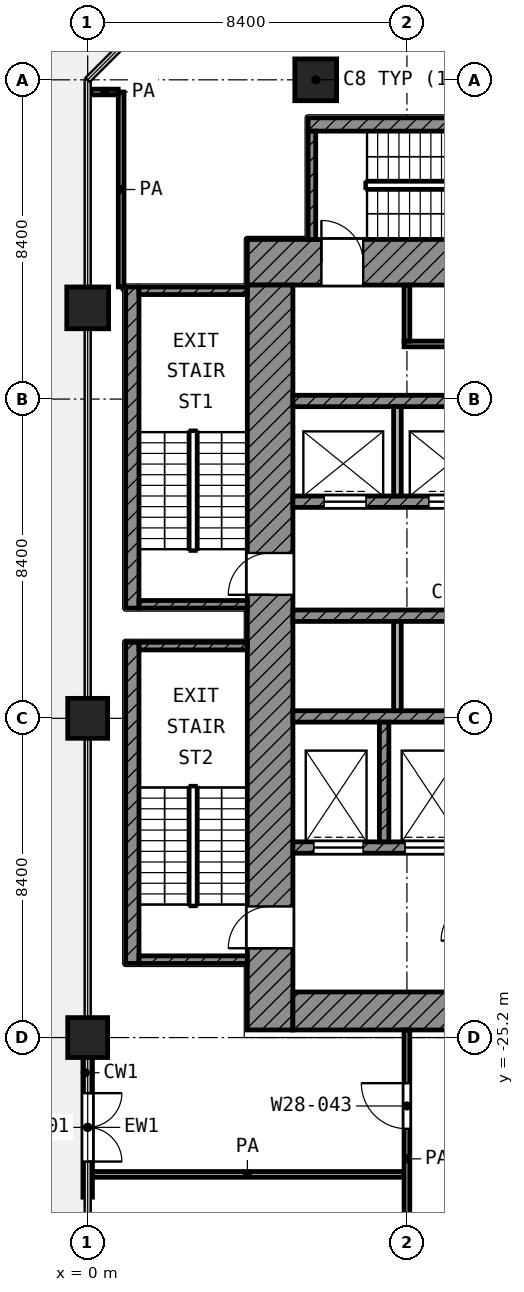
"""IFC4 building model, lengths in metres.
Left out: names, types, materials, properties, quantities, classifications, styles, units other than length and angle.
Written with IfcOpenShell. Run it as: python <this file> out.ifc"""

import sys

from ifc_helpers import new_model, si_unit, direction, frame, frame_2d, origin, origin_2d, place, context, subcontext, project, spatial, rectangle, extrude, element, fill, save


model = new_model("IFC4")
c1 = context("Model", 3, precision=1e-05, world=origin(), true_north=direction((0.0, 1.0)))
c2 = subcontext(c1, "Body", "Model", "MODEL_VIEW")
j1 = project(units=[si_unit("LENGTHUNIT", "METRE"), si_unit("PLANEANGLEUNIT", "RADIAN")], contexts=[c1])
p1 = place(None, origin())
s1 = spatial("IfcSite", under=j1, at=p1, CompositionType="ELEMENT")
p2 = place(p1, origin())
s2 = spatial("IfcBuilding", under=s1, at=p2, CompositionType="ELEMENT")
p3 = place(p2, frame((0.0, 0.0, 145.0)))
s3 = spatial("IfcBuildingStorey", under=s2, at=p3, CompositionType="ELEMENT", Elevation=145.0)
for number, where, z_axis, x_axis in (
    (1, (6.0, 0.0, 0.0), (0.0, 0.0, 1.0), (1.0, 0.0, 0.0)),
    (2, (0.0, -6.0, 0.0), (0.0, 0.0, 1.0), (1.0, 0.0, 0.0)),
):
    element("IfcColumn", number, at=place(p3, frame(where, z_axis=z_axis, x_axis=x_axis)), inside=s3, PredefinedType="COLUMN", context=c2, shape_type="SweptSolid", body=[
        extrude(rectangle(XDim=1.1, YDim=1.1, at=origin_2d()), origin(), (0.0, 0.0, 1.0), 4.2),
    ])
for number, where, z_axis, x_axis in (
    (3, (0.0, -16.8, 0.0), (0.0, 0.0, 1.0), (1.0, 0.0, 0.0)),
    (4, (0.0, -25.2, 0.0), (0.0, 0.0, 1.0), (1.0, 0.0, 0.0)),
):
    element("IfcColumn", number, at=place(p3, frame(where, z_axis=z_axis, x_axis=x_axis)), inside=s3, PredefinedType="COLUMN", context=c2, shape_type="SweptSolid", body=[
        extrude(rectangle(XDim=1.05, YDim=1.05, at=origin_2d()), origin(), (0.0, 0.0, 1.0), 4.2),
    ])
p4 = place(p3, frame((0.0, -25.725, 0.0), z_axis=(0.0, 0.0, 1.0), x_axis=(0.0, -1.0, 0.0)))
e5 = element("IfcWall", 5, at=p4, inside=s3, PredefinedType="SOLIDWALL", context=c2, shape_type="SweptSolid", body=[
    extrude(rectangle(XDim=3.675, YDim=0.25, at=frame_2d((1.837, 0.0))), origin(), (0.0, 0.0, 1.0), 3.48),
])
p5 = place(p4, frame((0.938, 0.0, 0.0)))
e6 = element("IfcOpeningElement", 6, at=p5, cuts=e5, PredefinedType="OPENING", context=c2, shape_type="SweptSolid", body=[
    extrude(rectangle(XDim=1.8, YDim=2.1, at=frame_2d((0.9, 1.05))), frame((0.0, 0.135, 0.0), z_axis=(0.0, -1.0, 0.0), x_axis=(1.0, 0.0, 0.0)), (0.0, 0.0, 1.0), 0.27),
])
p6 = place(p3, frame((4.2, -4.8, 0.0), z_axis=(0.0, 0.0, 1.0), x_axis=(1.0, 0.0, 0.0)))
e7 = element("IfcWall", 7, at=p6, inside=s3, PredefinedType="SHEAR", context=c2, shape_type="SweptSolid", body=[
    extrude(rectangle(XDim=20.8, YDim=1.2, at=frame_2d((10.4, 0.0))), origin(), (0.0, 0.0, 1.0), 3.6),
])
p7 = place(p6, frame((1.95, 0.0, 0.0)))
e8 = element("IfcOpeningElement", 8, at=p7, cuts=e7, PredefinedType="OPENING", context=c2, shape_type="SweptSolid", body=[
    extrude(rectangle(XDim=1.1, YDim=2.1, at=frame_2d((0.55, 1.05))), frame((0.0, 0.61, 0.0), z_axis=(0.0, -1.0, 0.0), x_axis=(1.0, 0.0, 0.0)), (0.0, 0.0, 1.0), 1.22),
])
p8 = place(p6, frame((17.95, 0.0, 0.0)))
e9 = element("IfcOpeningElement", 9, at=p8, cuts=e7, PredefinedType="OPENING", context=c2, shape_type="SweptSolid", body=[
    extrude(rectangle(XDim=1.1, YDim=2.1, at=frame_2d((0.55, 1.05))), frame((0.0, 0.61, 0.0), z_axis=(0.0, -1.0, 0.0), x_axis=(1.0, 0.0, 0.0)), (0.0, 0.0, 1.0), 1.22),
])
p9 = place(p3, frame((4.8, -25.0, 0.0), z_axis=(0.0, 0.0, 1.0), x_axis=(0.0, 1.0, 0.0)))
e10 = element("IfcWall", 10, at=p9, inside=s3, PredefinedType="SHEAR", context=c2, shape_type="SweptSolid", body=[
    extrude(rectangle(XDim=19.6, YDim=1.2, at=frame_2d((9.8, 0.0))), origin(), (0.0, 0.0, 1.0), 3.6),
])
p10 = place(p9, frame((11.45, 0.0, 0.0)))
e11 = element("IfcOpeningElement", 11, at=p10, cuts=e10, PredefinedType="OPENING", context=c2, shape_type="SweptSolid", body=[
    extrude(rectangle(XDim=1.1, YDim=2.1, at=frame_2d((0.55, 1.05))), frame((0.0, 0.61, 0.0), z_axis=(0.0, -1.0, 0.0), x_axis=(1.0, 0.0, 0.0)), (0.0, 0.0, 1.0), 1.22),
])
p11 = place(p9, frame((2.15, 0.0, 0.0)))
e12 = element("IfcOpeningElement", 12, at=p11, cuts=e10, PredefinedType="OPENING", context=c2, shape_type="SweptSolid", body=[
    extrude(rectangle(XDim=1.1, YDim=2.1, at=frame_2d((0.55, 1.05))), frame((0.0, 0.61, 0.0), z_axis=(0.0, -1.0, 0.0), x_axis=(1.0, 0.0, 0.0)), (0.0, 0.0, 1.0), 1.22),
])
p12 = place(p3, frame((5.4, -24.5, 0.0), z_axis=(0.0, 0.0, 1.0), x_axis=(1.0, 0.0, 0.0)))
e13 = element("IfcWall", 13, at=p12, inside=s3, PredefinedType="SHEAR", context=c2, shape_type="SweptSolid", body=[
    extrude(rectangle(XDim=18.6, YDim=1.0, at=frame_2d((9.3, 0.0))), origin(), (0.0, 0.0, 1.0), 3.6),
])
p13 = place(p12, frame((6.3, 0.0, 0.0)))
e14 = element("IfcOpeningElement", 14, at=p13, cuts=e13, PredefinedType="OPENING", context=c2, shape_type="SweptSolid", body=[
    extrude(rectangle(XDim=1.8, YDim=2.1, at=frame_2d((0.9, 1.05))), frame((0.0, 0.51, 0.0), z_axis=(0.0, -1.0, 0.0), x_axis=(1.0, 0.0, 0.0)), (0.0, 0.0, 1.0), 1.02),
])
p14 = place(p3, frame((5.4, -8.45, 0.0), z_axis=(0.0, 0.0, 1.0), x_axis=(1.0, 0.0, 0.0)))
e15 = element("IfcWall", 15, at=p14, inside=s3, PredefinedType="SHEAR", context=c2, shape_type="SweptSolid", body=[
    extrude(rectangle(XDim=16.65, YDim=0.3, at=frame_2d((8.325, 0.0))), origin(), (0.0, 0.0, 1.0), 3.6),
])
p15 = place(p3, frame((5.4, -11.1, 0.0), z_axis=(0.0, 0.0, 1.0), x_axis=(1.0, 0.0, 0.0)))
e16 = element("IfcWall", 16, at=p15, inside=s3, PredefinedType="SHEAR", context=c2, shape_type="SweptSolid", body=[
    extrude(rectangle(XDim=16.65, YDim=0.3, at=frame_2d((8.325, 0.0))), origin(), (0.0, 0.0, 1.0), 3.6),
])
p16 = place(p15, frame((0.825, 0.0, 0.0)))
e17 = element("IfcOpeningElement", 17, at=p16, cuts=e16, PredefinedType="OPENING", context=c2, shape_type="SweptSolid", body=[
    extrude(rectangle(XDim=1.1, YDim=2.1, at=frame_2d((0.55, 1.05))), frame((0.0, 0.16, 0.0), z_axis=(0.0, -1.0, 0.0), x_axis=(1.0, 0.0, 0.0)), (0.0, 0.0, 1.0), 0.32),
])
p17 = place(p15, frame((3.575, 0.0, 0.0)))
e18 = element("IfcOpeningElement", 18, at=p17, cuts=e16, PredefinedType="OPENING", context=c2, shape_type="SweptSolid", body=[
    extrude(rectangle(XDim=1.1, YDim=2.1, at=frame_2d((0.55, 1.05))), frame((0.0, 0.16, 0.0), z_axis=(0.0, -1.0, 0.0), x_axis=(1.0, 0.0, 0.0)), (0.0, 0.0, 1.0), 0.32),
])
p18 = place(p15, frame((6.325, 0.0, 0.0)))
e19 = element("IfcOpeningElement", 19, at=p18, cuts=e16, PredefinedType="OPENING", context=c2, shape_type="SweptSolid", body=[
    extrude(rectangle(XDim=1.1, YDim=2.1, at=frame_2d((0.55, 1.05))), frame((0.0, 0.16, 0.0), z_axis=(0.0, -1.0, 0.0), x_axis=(1.0, 0.0, 0.0)), (0.0, 0.0, 1.0), 0.32),
])
p19 = place(p15, frame((9.075, 0.0, 0.0)))
e20 = element("IfcOpeningElement", 20, at=p19, cuts=e16, PredefinedType="OPENING", context=c2, shape_type="SweptSolid", body=[
    extrude(rectangle(XDim=1.1, YDim=2.1, at=frame_2d((0.55, 1.05))), frame((0.0, 0.16, 0.0), z_axis=(0.0, -1.0, 0.0), x_axis=(1.0, 0.0, 0.0)), (0.0, 0.0, 1.0), 0.32),
])
for number, where, z_axis, x_axis in (
    (21, (5.4, -14.1, 0.0), (0.0, 0.0, 1.0), (1.0, 0.0, 0.0)),
    (22, (5.4, -16.75, 0.0), (0.0, 0.0, 1.0), (1.0, 0.0, 0.0)),
):
    element("IfcWall", number, at=place(p3, frame(where, z_axis=z_axis, x_axis=x_axis)), inside=s3, PredefinedType="SHEAR", context=c2, shape_type="SweptSolid", body=[
        extrude(rectangle(XDim=16.65, YDim=0.3, at=frame_2d((8.325, 0.0))), origin(), (0.0, 0.0, 1.0), 3.6),
    ])
p20 = place(p3, frame((5.4, -20.2, 0.0), z_axis=(0.0, 0.0, 1.0), x_axis=(1.0, 0.0, 0.0)))
e23 = element("IfcWall", 23, at=p20, inside=s3, PredefinedType="SHEAR", context=c2, shape_type="SweptSolid", body=[
    extrude(rectangle(XDim=14.65, YDim=0.3, at=frame_2d((7.325, 0.0))), origin(), (0.0, 0.0, 1.0), 3.6),
])
p21 = place(p20, frame((10.55, 0.0, 0.0)))
e24 = element("IfcOpeningElement", 24, at=p21, cuts=e23, PredefinedType="OPENING", context=c2, shape_type="SweptSolid", body=[
    extrude(rectangle(XDim=1.3, YDim=2.1, at=frame_2d((0.65, 1.05))), frame((0.0, 0.16, 0.0), z_axis=(0.0, -1.0, 0.0), x_axis=(1.0, 0.0, 0.0)), (0.0, 0.0, 1.0), 0.32),
])
p22 = place(p20, frame((12.95, 0.0, 0.0)))
e25 = element("IfcOpeningElement", 25, at=p22, cuts=e23, PredefinedType="OPENING", context=c2, shape_type="SweptSolid", body=[
    extrude(rectangle(XDim=1.3, YDim=2.1, at=frame_2d((0.65, 1.05))), frame((0.0, 0.16, 0.0), z_axis=(0.0, -1.0, 0.0), x_axis=(1.0, 0.0, 0.0)), (0.0, 0.0, 1.0), 0.32),
])
p23 = place(p20, frame((0.55, 0.0, 0.0)))
e26 = element("IfcOpeningElement", 26, at=p23, cuts=e23, PredefinedType="OPENING", context=c2, shape_type="SweptSolid", body=[
    extrude(rectangle(XDim=1.3, YDim=2.1, at=frame_2d((0.65, 1.05))), frame((0.0, 0.16, 0.0), z_axis=(0.0, -1.0, 0.0), x_axis=(1.0, 0.0, 0.0)), (0.0, 0.0, 1.0), 0.32),
])
p24 = place(p20, frame((2.95, 0.0, 0.0)))
e27 = element("IfcOpeningElement", 27, at=p24, cuts=e23, PredefinedType="OPENING", context=c2, shape_type="SweptSolid", body=[
    extrude(rectangle(XDim=1.3, YDim=2.1, at=frame_2d((0.65, 1.05))), frame((0.0, 0.16, 0.0), z_axis=(0.0, -1.0, 0.0), x_axis=(1.0, 0.0, 0.0)), (0.0, 0.0, 1.0), 0.32),
])
p25 = place(p20, frame((7.15, 0.0, 0.0)))
e28 = element("IfcOpeningElement", 28, at=p25, cuts=e23, PredefinedType="OPENING", context=c2, shape_type="SweptSolid", body=[
    extrude(rectangle(XDim=0.9, YDim=2.1, at=frame_2d((0.45, 1.05))), frame((0.0, 0.16, 0.0), z_axis=(0.0, -1.0, 0.0), x_axis=(1.0, 0.0, 0.0)), (0.0, 0.0, 1.0), 0.32),
])
p26 = place(p3, frame((7.8, -20.05, 0.0), z_axis=(0.0, 0.0, 1.0), x_axis=(0.0, 1.0, 0.0)))
e29 = element("IfcWall", 29, at=p26, inside=s3, PredefinedType="SHEAR", context=c2, shape_type="SweptSolid", body=[
    extrude(rectangle(XDim=3.15, YDim=0.25, at=frame_2d((1.575, 0.0))), origin(), (0.0, 0.0, 1.0), 3.6),
])
p27 = place(p3, frame((8.15, -10.95, 0.0), z_axis=(0.0, 0.0, 1.0), x_axis=(0.0, 1.0, 0.0)))
e30 = element("IfcWall", 30, at=p27, inside=s3, PredefinedType="PARTITIONING", context=c2, shape_type="SweptSolid", body=[
    extrude(rectangle(XDim=2.35, YDim=0.2, at=frame_2d((1.175, 0.0))), origin(), (0.0, 0.0, 1.0), 3.6),
])
p28 = place(p3, frame((8.15, -16.6, 0.0), z_axis=(0.0, 0.0, 1.0), x_axis=(0.0, 1.0, 0.0)))
e31 = element("IfcWall", 31, at=p28, inside=s3, PredefinedType="PARTITIONING", context=c2, shape_type="SweptSolid", body=[
    extrude(rectangle(XDim=2.35, YDim=0.2, at=frame_2d((1.175, 0.0))), origin(), (0.0, 0.0, 1.0), 3.6),
])
p29 = place(p3, frame((8.325, -6.95, 0.0), z_axis=(0.0, 0.0, 1.0), x_axis=(1.0, 0.0, 0.0)))
e32 = element("IfcWall", 32, at=p29, inside=s3, PredefinedType="PARTITIONING", context=c2, shape_type="SweptSolid", body=[
    extrude(rectangle(XDim=12.75, YDim=0.15, at=frame_2d((6.375, 0.0))), origin(), (0.0, 0.0, 1.0), 3.6),
])
p30 = place(p29, frame((1.725, 0.0, 0.0)))
e33 = element("IfcOpeningElement", 33, at=p30, cuts=e32, PredefinedType="OPENING", context=c2, shape_type="SweptSolid", body=[
    extrude(rectangle(XDim=0.9, YDim=2.1, at=frame_2d((0.45, 1.05))), frame((0.0, 0.085, 0.0), z_axis=(0.0, -1.0, 0.0), x_axis=(1.0, 0.0, 0.0)), (0.0, 0.0, 1.0), 0.17),
])
p31 = place(p29, frame((5.925, 0.0, 0.0)))
e34 = element("IfcOpeningElement", 34, at=p31, cuts=e32, PredefinedType="OPENING", context=c2, shape_type="SweptSolid", body=[
    extrude(rectangle(XDim=0.9, YDim=2.1, at=frame_2d((0.45, 1.05))), frame((0.0, 0.085, 0.0), z_axis=(0.0, -1.0, 0.0), x_axis=(1.0, 0.0, 0.0)), (0.0, 0.0, 1.0), 0.17),
])
p32 = place(p29, frame((10.125, 0.0, 0.0)))
e35 = element("IfcOpeningElement", 35, at=p32, cuts=e32, PredefinedType="OPENING", context=c2, shape_type="SweptSolid", body=[
    extrude(rectangle(XDim=0.9, YDim=2.1, at=frame_2d((0.45, 1.05))), frame((0.0, 0.085, 0.0), z_axis=(0.0, -1.0, 0.0), x_axis=(1.0, 0.0, 0.0)), (0.0, 0.0, 1.0), 0.17),
])
p33 = place(p3, frame((8.4, -6.875, 0.0), z_axis=(0.0, 0.0, 1.0), x_axis=(0.0, 1.0, 0.0)))
e36 = element("IfcWall", 36, at=p33, inside=s3, PredefinedType="PARTITIONING", context=c2, shape_type="SweptSolid", body=[
    extrude(rectangle(XDim=1.475, YDim=0.15, at=frame_2d((0.738, 0.0))), origin(), (0.0, 0.0, 1.0), 3.6),
])
p34 = place(p3, frame((1.175, -13.9, 0.0), z_axis=(0.0, 0.0, 1.0), x_axis=(0.0, 1.0, 0.0)))
e37 = element("IfcWall", 37, at=p34, inside=s3, PredefinedType="SHEAR", context=c2, shape_type="SweptSolid", body=[
    extrude(rectangle(XDim=8.45, YDim=0.35, at=frame_2d((4.225, 0.0))), origin(), (0.0, 0.0, 1.0), 3.6),
])
for number, where, z_axis, x_axis in (
    (38, (1.35, -5.55, 0.0), (0.0, 0.0, 1.0), (1.0, 0.0, 0.0)),
    (39, (1.35, -13.8, 0.0), (0.0, 0.0, 1.0), (1.0, 0.0, 0.0)),
):
    element("IfcWall", number, at=place(p3, frame(where, z_axis=z_axis, x_axis=x_axis)), inside=s3, PredefinedType="SHEAR", context=c2, shape_type="SweptSolid", body=[
        extrude(rectangle(XDim=2.85, YDim=0.2, at=frame_2d((1.425, 0.0))), origin(), (0.0, 0.0, 1.0), 3.6),
    ])
p35 = place(p3, frame((1.175, -23.25, 0.0), z_axis=(0.0, 0.0, 1.0), x_axis=(0.0, 1.0, 0.0)))
e40 = element("IfcWall", 40, at=p35, inside=s3, PredefinedType="SHEAR", context=c2, shape_type="SweptSolid", body=[
    extrude(rectangle(XDim=8.45, YDim=0.35, at=frame_2d((4.225, 0.0))), origin(), (0.0, 0.0, 1.0), 3.6),
])
for number, where, z_axis, x_axis in (
    (41, (1.35, -14.9, 0.0), (0.0, 0.0, 1.0), (1.0, 0.0, 0.0)),
    (42, (1.35, -23.15, 0.0), (0.0, 0.0, 1.0), (1.0, 0.0, 0.0)),
):
    element("IfcWall", number, at=place(p3, frame(where, z_axis=z_axis, x_axis=x_axis)), inside=s3, PredefinedType="SHEAR", context=c2, shape_type="SweptSolid", body=[
        extrude(rectangle(XDim=2.85, YDim=0.2, at=frame_2d((1.425, 0.0))), origin(), (0.0, 0.0, 1.0), 3.6),
    ])
p36 = place(p3, frame((5.8, -1.175, 0.0), z_axis=(0.0, 0.0, 1.0), x_axis=(1.0, 0.0, 0.0)))
e43 = element("IfcWall", 43, at=p36, inside=s3, PredefinedType="SHEAR", context=c2, shape_type="SweptSolid", body=[
    extrude(rectangle(XDim=8.45, YDim=0.35, at=frame_2d((4.225, 0.0))), origin(), (0.0, 0.0, 1.0), 3.6),
])
p37 = place(p3, frame((5.9, -4.2, 0.0), z_axis=(0.0, 0.0, 1.0), x_axis=(0.0, 1.0, 0.0)))
e44 = element("IfcWall", 44, at=p37, inside=s3, PredefinedType="SHEAR", context=c2, shape_type="SweptSolid", body=[
    extrude(rectangle(XDim=2.85, YDim=0.2, at=frame_2d((1.425, 0.0))), origin(), (0.0, 0.0, 1.0), 3.6),
])
p38 = place(p3, frame((0.08, -28.8, 0.0), z_axis=(0.0, 0.0, 1.0), x_axis=(1.0, 0.0, 0.0)))
e45 = element("IfcWall", 45, at=p38, inside=s3, PredefinedType="PARTITIONING", context=c2, shape_type="SweptSolid", body=[
    extrude(rectangle(XDim=8.245, YDim=0.15, at=frame_2d((4.123, 0.0))), origin(), (0.0, 0.0, 1.0), 3.6),
])
p39 = place(p3, frame((0.08, -0.32, 0.0), z_axis=(0.0, 0.0, 1.0), x_axis=(1.0, 0.0, 0.0)))
e46 = element("IfcWall", 46, at=p39, inside=s3, PredefinedType="PARTITIONING", context=c2, shape_type="SweptSolid", body=[
    extrude(rectangle(XDim=0.723, YDim=0.15, at=frame_2d((0.361, 0.0))), origin(), (0.0, 0.0, 1.0), 3.6),
])
p40 = place(p3, frame((0.88, -5.45, 0.0), z_axis=(0.0, 0.0, 1.0), x_axis=(0.0, 1.0, 0.0)))
e47 = element("IfcWall", 47, at=p40, inside=s3, PredefinedType="PARTITIONING", context=c2, shape_type="SweptSolid", body=[
    extrude(rectangle(XDim=5.128, YDim=0.15, at=frame_2d((2.564, 0.0))), origin(), (0.0, 0.0, 1.0), 3.6),
])
p41 = place(p3, frame((8.4, -31.782, 0.0), z_axis=(0.0, 0.0, 1.0), x_axis=(0.0, 1.0, 0.0)))
e48 = element("IfcWall", 48, at=p41, inside=s3, PredefinedType="PARTITIONING", context=c2, shape_type="SweptSolid", body=[
    extrude(rectangle(XDim=6.782, YDim=0.15, at=frame_2d((3.391, 0.0))), origin(), (0.0, 0.0, 1.0), 3.6),
])
p42 = place(p41, frame((4.182, 0.0, 0.0)))
e49 = element("IfcOpeningElement", 49, at=p42, cuts=e48, PredefinedType="OPENING", context=c2, shape_type="SweptSolid", body=[
    extrude(rectangle(XDim=1.2, YDim=2.1, at=frame_2d((0.6, 1.05))), frame((0.0, 0.085, 0.0), z_axis=(0.0, -1.0, 0.0), x_axis=(1.0, 0.0, 0.0)), (0.0, 0.0, 1.0), 0.17),
])
p43 = place(p5, origin())
e50 = element("IfcDoor", 50, at=p43, inside=s3, OperationType="DOUBLE_DOOR_SINGLE_SWING", PredefinedType="DOOR", context=c2, shape_type="SweptSolid", body=[
    extrude(rectangle(XDim=1.8, YDim=2.1, at=frame_2d((0.9, 1.05))), frame((0.0, 0.025, 0.0), z_axis=(0.0, -1.0, 0.0), x_axis=(1.0, 0.0, 0.0)), (0.0, 0.0, 1.0), 0.05),
])
fill(e6, e50)
p44 = place(p16, origin())
e51 = element("IfcDoor", 51, at=p44, inside=s3, OperationType="DOUBLE_DOOR_SLIDING", PredefinedType="DOOR", context=c2, shape_type="SweptSolid", body=[
    extrude(rectangle(XDim=1.1, YDim=2.1, at=frame_2d((0.55, 1.05))), frame((0.0, 0.025, 0.0), z_axis=(0.0, -1.0, 0.0), x_axis=(1.0, 0.0, 0.0)), (0.0, 0.0, 1.0), 0.05),
])
fill(e17, e51)
p45 = place(p17, origin())
e52 = element("IfcDoor", 52, at=p45, inside=s3, OperationType="DOUBLE_DOOR_SLIDING", PredefinedType="DOOR", context=c2, shape_type="SweptSolid", body=[
    extrude(rectangle(XDim=1.1, YDim=2.1, at=frame_2d((0.55, 1.05))), frame((0.0, 0.025, 0.0), z_axis=(0.0, -1.0, 0.0), x_axis=(1.0, 0.0, 0.0)), (0.0, 0.0, 1.0), 0.05),
])
fill(e18, e52)
p46 = place(p23, origin())
e53 = element("IfcDoor", 53, at=p46, inside=s3, OperationType="DOUBLE_DOOR_SLIDING", PredefinedType="DOOR", context=c2, shape_type="SweptSolid", body=[
    extrude(rectangle(XDim=1.3, YDim=2.1, at=frame_2d((0.65, 1.05))), frame((0.0, 0.025, 0.0), z_axis=(0.0, -1.0, 0.0), x_axis=(1.0, 0.0, 0.0)), (0.0, 0.0, 1.0), 0.05),
])
fill(e26, e53)
p47 = place(p24, origin())
e54 = element("IfcDoor", 54, at=p47, inside=s3, OperationType="DOUBLE_DOOR_SLIDING", PredefinedType="DOOR", context=c2, shape_type="SweptSolid", body=[
    extrude(rectangle(XDim=1.3, YDim=2.1, at=frame_2d((0.65, 1.05))), frame((0.0, 0.025, 0.0), z_axis=(0.0, -1.0, 0.0), x_axis=(1.0, 0.0, 0.0)), (0.0, 0.0, 1.0), 0.05),
])
fill(e27, e54)
p48 = place(p10, origin())
e55 = element("IfcDoor", 55, at=p48, inside=s3, OperationType="SINGLE_SWING_LEFT", PredefinedType="DOOR", context=c2, shape_type="SweptSolid", body=[
    extrude(rectangle(XDim=1.1, YDim=2.1, at=frame_2d((0.55, 1.05))), frame((0.0, 0.025, 0.0), z_axis=(0.0, -1.0, 0.0), x_axis=(1.0, 0.0, 0.0)), (0.0, 0.0, 1.0), 0.05),
])
fill(e11, e55)
p49 = place(p11, origin())
e56 = element("IfcDoor", 56, at=p49, inside=s3, OperationType="SINGLE_SWING_LEFT", PredefinedType="DOOR", context=c2, shape_type="SweptSolid", body=[
    extrude(rectangle(XDim=1.1, YDim=2.1, at=frame_2d((0.55, 1.05))), frame((0.0, 0.025, 0.0), z_axis=(0.0, -1.0, 0.0), x_axis=(1.0, 0.0, 0.0)), (0.0, 0.0, 1.0), 0.05),
])
fill(e12, e56)
p50 = place(p7, origin())
e57 = element("IfcDoor", 57, at=p50, inside=s3, OperationType="SINGLE_SWING_LEFT", PredefinedType="DOOR", context=c2, shape_type="SweptSolid", body=[
    extrude(rectangle(XDim=1.1, YDim=2.1, at=frame_2d((0.55, 1.05))), frame((0.0, 0.025, 0.0), z_axis=(0.0, -1.0, 0.0), x_axis=(1.0, 0.0, 0.0)), (0.0, 0.0, 1.0), 0.05),
])
fill(e8, e57)
p51 = place(p42, origin())
e58 = element("IfcDoor", 58, at=p51, inside=s3, OperationType="SINGLE_SWING_RIGHT", PredefinedType="DOOR", context=c2, shape_type="SweptSolid", body=[
    extrude(rectangle(XDim=1.2, YDim=2.1, at=frame_2d((0.6, 1.05))), frame((0.0, 0.025, 0.0), z_axis=(0.0, -1.0, 0.0), x_axis=(1.0, 0.0, 0.0)), (0.0, 0.0, 1.0), 0.05),
])
fill(e49, e58)
save(model, sys.argv[1])
